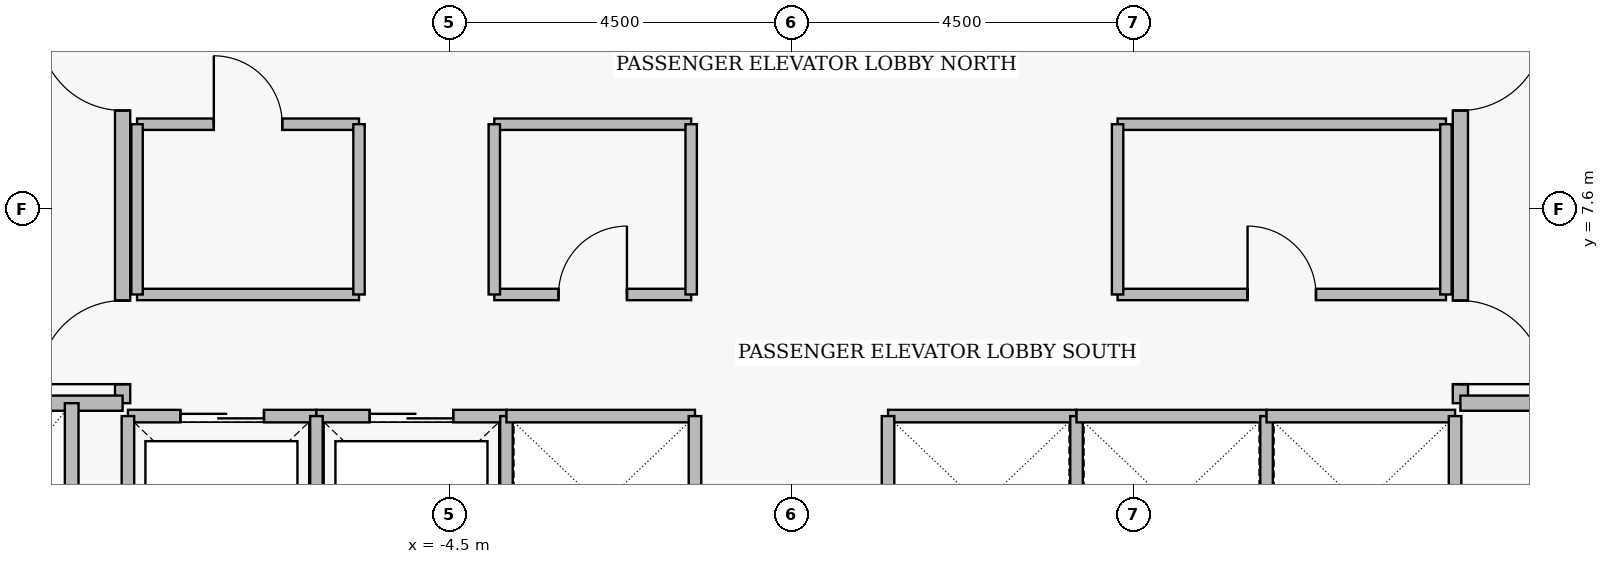
"""IFC4 building model, lengths in metres.
Left out: names, types, materials, properties, quantities, classifications, styles, units other than length and angle.
Written with IfcOpenShell. Run it as: python <this file> out.ifc"""

import sys

from ifc_helpers import new_model, si_unit, direction, frame, frame_2d, origin, place, context, subcontext, project, spatial, rectangle, extrude, element, fill, save


model = new_model("IFC4")
c1 = context("Model", 3, precision=1e-05, world=origin(), true_north=direction((0.0, 1.0)))
c2 = subcontext(c1, "Body", "Model", "MODEL_VIEW")
j1 = project(units=[si_unit("LENGTHUNIT", "METRE"), si_unit("PLANEANGLEUNIT", "RADIAN")], contexts=[c1])
p1 = place(None, origin())
s1 = spatial("IfcSite", under=j1, at=p1, CompositionType="ELEMENT")
p2 = place(p1, origin())
s2 = spatial("IfcBuilding", under=s1, at=p2, CompositionType="ELEMENT")
p3 = place(p2, frame((0.0, 0.0, 117.55)))
s3 = spatial("IfcBuildingStorey", under=s2, at=p3, CompositionType="ELEMENT", Elevation=117.55)
p4 = place(p3, frame((-8.8, 5.05, 0.0), z_axis=(0.0, 0.0, 1.0), x_axis=(0.0, 1.0, 0.0)))
e1 = element("IfcWall", 1, at=p4, inside=s3, PredefinedType="PARTITIONING", context=c2, shape_type="SweptSolid", body=[
    extrude(rectangle(XDim=6.1, YDim=0.2, at=frame_2d((3.05, 0.0))), origin(), (0.0, 0.0, 1.0), 3.43),
])
p5 = place(p4, frame((0.25, 0.0, 0.0)))
e2 = element("IfcOpeningElement", 2, at=p5, cuts=e1, PredefinedType="OPENING", context=c2, shape_type="SweptSolid", body=[
    extrude(rectangle(XDim=1.1, YDim=2.2, at=frame_2d((0.55, 1.1))), frame((0.0, 0.11, 0.0), z_axis=(0.0, -1.0, 0.0), x_axis=(1.0, 0.0, 0.0)), (0.0, 0.0, 1.0), 0.22),
])
p6 = place(p4, frame((3.85, 0.0, 0.0)))
e3 = element("IfcOpeningElement", 3, at=p6, cuts=e1, PredefinedType="OPENING", context=c2, shape_type="SweptSolid", body=[
    extrude(rectangle(XDim=1.1, YDim=2.2, at=frame_2d((0.55, 1.1))), frame((0.0, 0.11, 0.0), z_axis=(0.0, -1.0, 0.0), x_axis=(1.0, 0.0, 0.0)), (0.0, 0.0, 1.0), 0.22),
])
p7 = place(p3, frame((8.8, 11.15, 0.0), z_axis=(0.0, 0.0, 1.0), x_axis=(0.0, -1.0, 0.0)))
e4 = element("IfcWall", 4, at=p7, inside=s3, PredefinedType="PARTITIONING", context=c2, shape_type="SweptSolid", body=[
    extrude(rectangle(XDim=6.1, YDim=0.2, at=frame_2d((3.05, 0.0))), origin(), (0.0, 0.0, 1.0), 3.43),
])
p8 = place(p7, frame((1.15, 0.0, 0.0)))
e5 = element("IfcOpeningElement", 5, at=p8, cuts=e4, PredefinedType="OPENING", context=c2, shape_type="SweptSolid", body=[
    extrude(rectangle(XDim=1.1, YDim=2.2, at=frame_2d((0.55, 1.1))), frame((0.0, 0.11, 0.0), z_axis=(0.0, -1.0, 0.0), x_axis=(1.0, 0.0, 0.0)), (0.0, 0.0, 1.0), 0.22),
])
p9 = place(p7, frame((4.75, 0.0, 0.0)))
e6 = element("IfcOpeningElement", 6, at=p9, cuts=e4, PredefinedType="OPENING", context=c2, shape_type="SweptSolid", body=[
    extrude(rectangle(XDim=1.1, YDim=2.2, at=frame_2d((0.55, 1.1))), frame((0.0, 0.11, 0.0), z_axis=(0.0, -1.0, 0.0), x_axis=(1.0, 0.0, 0.0)), (0.0, 0.0, 1.0), 0.22),
])
p10 = place(p3, frame((-8.73, 4.88, 0.0), z_axis=(0.0, 0.0, 1.0), x_axis=(1.0, 0.0, 0.0)))
e7 = element("IfcWall", 7, at=p10, inside=s3, PredefinedType="PARTITIONING", context=c2, shape_type="SweptSolid", body=[
    extrude(rectangle(XDim=2.48, YDim=0.165, at=frame_2d((1.24, 0.0))), origin(), (0.0, 0.0, 1.0), 3.43),
])
p11 = place(p10, frame((0.69, 0.0, 0.0)))
e8 = element("IfcOpeningElement", 8, at=p11, cuts=e7, PredefinedType="OPENING", context=c2, shape_type="SweptSolid", body=[
    extrude(rectangle(XDim=1.1, YDim=2.25, at=frame_2d((0.55, 1.125))), frame((0.0, 0.093, 0.0), z_axis=(0.0, -1.0, 0.0), x_axis=(1.0, 0.0, 0.0)), (0.0, 0.0, 1.0), 0.185),
])
p12 = place(p3, frame((-6.25, 4.88, 0.0), z_axis=(0.0, 0.0, 1.0), x_axis=(1.0, 0.0, 0.0)))
e9 = element("IfcWall", 9, at=p12, inside=s3, PredefinedType="PARTITIONING", context=c2, shape_type="SweptSolid", body=[
    extrude(rectangle(XDim=2.5, YDim=0.165, at=frame_2d((1.25, 0.0))), origin(), (0.0, 0.0, 1.0), 3.43),
])
p13 = place(p12, frame((0.7, 0.0, 0.0)))
e10 = element("IfcOpeningElement", 10, at=p13, cuts=e9, PredefinedType="OPENING", context=c2, shape_type="SweptSolid", body=[
    extrude(rectangle(XDim=1.1, YDim=2.25, at=frame_2d((0.55, 1.125))), frame((0.0, 0.093, 0.0), z_axis=(0.0, -1.0, 0.0), x_axis=(1.0, 0.0, 0.0)), (0.0, 0.0, 1.0), 0.185),
])
p14 = place(p3, frame((-8.61, 8.72, 0.0), z_axis=(0.0, 0.0, 1.0), x_axis=(1.0, 0.0, 0.0)))
e11 = element("IfcWall", 11, at=p14, inside=s3, PredefinedType="PARTITIONING", context=c2, shape_type="SweptSolid", body=[
    extrude(rectangle(XDim=2.92, YDim=0.15, at=frame_2d((1.46, 0.0))), origin(), (0.0, 0.0, 1.0), 3.43),
])
p15 = place(p14, frame((1.01, 0.0, 0.0)))
e12 = element("IfcOpeningElement", 12, at=p15, cuts=e11, PredefinedType="OPENING", context=c2, shape_type="SweptSolid", body=[
    extrude(rectangle(XDim=0.9, YDim=2.15, at=frame_2d((0.45, 1.075))), frame((0.0, 0.085, 0.0), z_axis=(0.0, -1.0, 0.0), x_axis=(1.0, 0.0, 0.0)), (0.0, 0.0, 1.0), 0.17),
])
p16 = place(p3, frame((-3.91, 6.48, 0.0), z_axis=(0.0, 0.0, 1.0), x_axis=(1.0, 0.0, 0.0)))
e13 = element("IfcWall", 13, at=p16, inside=s3, PredefinedType="PARTITIONING", context=c2, shape_type="SweptSolid", body=[
    extrude(rectangle(XDim=2.59, YDim=0.15, at=frame_2d((1.295, 0.0))), origin(), (0.0, 0.0, 1.0), 3.43),
])
p17 = place(p16, frame((0.845, 0.0, 0.0)))
e14 = element("IfcOpeningElement", 14, at=p17, cuts=e13, PredefinedType="OPENING", context=c2, shape_type="SweptSolid", body=[
    extrude(rectangle(XDim=0.9, YDim=2.15, at=frame_2d((0.45, 1.075))), frame((0.0, 0.085, 0.0), z_axis=(0.0, -1.0, 0.0), x_axis=(1.0, 0.0, 0.0)), (0.0, 0.0, 1.0), 0.17),
])
p18 = place(p3, frame((4.29, 6.48, 0.0), z_axis=(0.0, 0.0, 1.0), x_axis=(1.0, 0.0, 0.0)))
e15 = element("IfcWall", 15, at=p18, inside=s3, PredefinedType="PARTITIONING", context=c2, shape_type="SweptSolid", body=[
    extrude(rectangle(XDim=4.32, YDim=0.15, at=frame_2d((2.16, 0.0))), origin(), (0.0, 0.0, 1.0), 3.43),
])
p19 = place(p18, frame((1.71, 0.0, 0.0)))
e16 = element("IfcOpeningElement", 16, at=p19, cuts=e15, PredefinedType="OPENING", context=c2, shape_type="SweptSolid", body=[
    extrude(rectangle(XDim=0.9, YDim=2.15, at=frame_2d((0.45, 1.075))), frame((0.0, 0.085, 0.0), z_axis=(0.0, -1.0, 0.0), x_axis=(1.0, 0.0, 0.0)), (0.0, 0.0, 1.0), 0.17),
])
for number, where, z_axis, x_axis in (
    (17, (-11.65, 5.05, 0.0), (0.0, 0.0, 1.0), (1.0, 0.0, 0.0)),
    (18, (8.8, 5.05, 0.0), (0.0, 0.0, 1.0), (1.0, 0.0, 0.0)),
):
    element("IfcWall", number, at=place(p3, frame(where, z_axis=z_axis, x_axis=x_axis)), inside=s3, PredefinedType="PARTITIONING", context=c2, shape_type="SweptSolid", body=[
        extrude(rectangle(XDim=2.85, YDim=0.2, at=frame_2d((1.425, 0.0))), origin(), (0.0, 0.0, 1.0), 3.43),
    ])
for number, where, z_axis, x_axis in (
    (19, (-8.73, 2.52, 0.0), (0.0, 0.0, 1.0), (0.0, 1.0, 0.0)),
    (20, (-6.25, 2.52, 0.0), (0.0, 0.0, 1.0), (0.0, 1.0, 0.0)),
    (21, (-3.75, 2.52, 0.0), (0.0, 0.0, 1.0), (0.0, 1.0, 0.0)),
):
    element("IfcWall", number, at=place(p3, frame(where, z_axis=z_axis, x_axis=x_axis)), inside=s3, PredefinedType="PARTITIONING", context=c2, shape_type="SweptSolid", body=[
        extrude(rectangle(XDim=2.36, YDim=0.165, at=frame_2d((1.18, 0.0))), origin(), (0.0, 0.0, 1.0), 3.43),
    ])
p20 = place(p3, frame((-3.75, 4.88, 0.0), z_axis=(0.0, 0.0, 1.0), x_axis=(1.0, 0.0, 0.0)))
e22 = element("IfcWall", 22, at=p20, inside=s3, PredefinedType="PARTITIONING", context=c2, shape_type="SweptSolid", body=[
    extrude(rectangle(XDim=2.48, YDim=0.165, at=frame_2d((1.24, 0.0))), origin(), (0.0, 0.0, 1.0), 3.43),
])
p21 = place(p3, frame((-1.27, 2.52, 0.0), z_axis=(0.0, 0.0, 1.0), x_axis=(0.0, 1.0, 0.0)))
e23 = element("IfcWall", 23, at=p21, inside=s3, PredefinedType="PARTITIONING", context=c2, shape_type="SweptSolid", body=[
    extrude(rectangle(XDim=2.36, YDim=0.165, at=frame_2d((1.18, 0.0))), origin(), (0.0, 0.0, 1.0), 3.43),
])
p22 = place(p3, frame((1.27, 4.88, 0.0), z_axis=(0.0, 0.0, 1.0), x_axis=(1.0, 0.0, 0.0)))
e24 = element("IfcWall", 24, at=p22, inside=s3, PredefinedType="PARTITIONING", context=c2, shape_type="SweptSolid", body=[
    extrude(rectangle(XDim=2.48, YDim=0.165, at=frame_2d((1.24, 0.0))), origin(), (0.0, 0.0, 1.0), 3.43),
])
for number, where, z_axis, x_axis in (
    (25, (1.27, 2.52, 0.0), (0.0, 0.0, 1.0), (0.0, 1.0, 0.0)),
    (26, (3.75, 2.52, 0.0), (0.0, 0.0, 1.0), (0.0, 1.0, 0.0)),
):
    element("IfcWall", number, at=place(p3, frame(where, z_axis=z_axis, x_axis=x_axis)), inside=s3, PredefinedType="PARTITIONING", context=c2, shape_type="SweptSolid", body=[
        extrude(rectangle(XDim=2.36, YDim=0.165, at=frame_2d((1.18, 0.0))), origin(), (0.0, 0.0, 1.0), 3.43),
    ])
p23 = place(p3, frame((3.75, 4.88, 0.0), z_axis=(0.0, 0.0, 1.0), x_axis=(1.0, 0.0, 0.0)))
e27 = element("IfcWall", 27, at=p23, inside=s3, PredefinedType="PARTITIONING", context=c2, shape_type="SweptSolid", body=[
    extrude(rectangle(XDim=2.5, YDim=0.165, at=frame_2d((1.25, 0.0))), origin(), (0.0, 0.0, 1.0), 3.43),
])
p24 = place(p3, frame((6.25, 2.52, 0.0), z_axis=(0.0, 0.0, 1.0), x_axis=(0.0, 1.0, 0.0)))
e28 = element("IfcWall", 28, at=p24, inside=s3, PredefinedType="PARTITIONING", context=c2, shape_type="SweptSolid", body=[
    extrude(rectangle(XDim=2.36, YDim=0.165, at=frame_2d((1.18, 0.0))), origin(), (0.0, 0.0, 1.0), 3.43),
])
p25 = place(p3, frame((6.25, 4.88, 0.0), z_axis=(0.0, 0.0, 1.0), x_axis=(1.0, 0.0, 0.0)))
e29 = element("IfcWall", 29, at=p25, inside=s3, PredefinedType="PARTITIONING", context=c2, shape_type="SweptSolid", body=[
    extrude(rectangle(XDim=2.48, YDim=0.165, at=frame_2d((1.24, 0.0))), origin(), (0.0, 0.0, 1.0), 3.43),
])
p26 = place(p3, frame((8.73, 2.52, 0.0), z_axis=(0.0, 0.0, 1.0), x_axis=(0.0, 1.0, 0.0)))
e30 = element("IfcWall", 30, at=p26, inside=s3, PredefinedType="PARTITIONING", context=c2, shape_type="SweptSolid", body=[
    extrude(rectangle(XDim=2.36, YDim=0.165, at=frame_2d((1.18, 0.0))), origin(), (0.0, 0.0, 1.0), 3.43),
])
p27 = place(p3, frame((-9.47, 2.45, 0.0), z_axis=(0.0, 0.0, 1.0), x_axis=(0.0, 1.0, 0.0)))
e31 = element("IfcWall", 31, at=p27, inside=s3, PredefinedType="PARTITIONING", context=c2, shape_type="SweptSolid", body=[
    extrude(rectangle(XDim=2.6, YDim=0.18, at=frame_2d((1.3, 0.0))), origin(), (0.0, 0.0, 1.0), 3.43),
])
p28 = place(p3, frame((-8.61, 6.48, 0.0), z_axis=(0.0, 0.0, 1.0), x_axis=(1.0, 0.0, 0.0)))
e32 = element("IfcWall", 32, at=p28, inside=s3, PredefinedType="PARTITIONING", context=c2, shape_type="SweptSolid", body=[
    extrude(rectangle(XDim=2.92, YDim=0.15, at=frame_2d((1.46, 0.0))), origin(), (0.0, 0.0, 1.0), 3.43),
])
for number, where, z_axis, x_axis in (
    (33, (-8.61, 6.48, 0.0), (0.0, 0.0, 1.0), (0.0, 1.0, 0.0)),
    (34, (-5.69, 6.48, 0.0), (0.0, 0.0, 1.0), (0.0, 1.0, 0.0)),
):
    element("IfcWall", number, at=place(p3, frame(where, z_axis=z_axis, x_axis=x_axis)), inside=s3, PredefinedType="PARTITIONING", context=c2, shape_type="SweptSolid", body=[
        extrude(rectangle(XDim=2.24, YDim=0.15, at=frame_2d((1.12, 0.0))), origin(), (0.0, 0.0, 1.0), 3.43),
    ])
p29 = place(p3, frame((-3.91, 8.72, 0.0), z_axis=(0.0, 0.0, 1.0), x_axis=(1.0, 0.0, 0.0)))
e35 = element("IfcWall", 35, at=p29, inside=s3, PredefinedType="PARTITIONING", context=c2, shape_type="SweptSolid", body=[
    extrude(rectangle(XDim=2.59, YDim=0.15, at=frame_2d((1.295, 0.0))), origin(), (0.0, 0.0, 1.0), 3.43),
])
for number, where, z_axis, x_axis in (
    (36, (-3.91, 6.48, 0.0), (0.0, 0.0, 1.0), (0.0, 1.0, 0.0)),
    (37, (-1.32, 6.48, 0.0), (0.0, 0.0, 1.0), (0.0, 1.0, 0.0)),
):
    element("IfcWall", number, at=place(p3, frame(where, z_axis=z_axis, x_axis=x_axis)), inside=s3, PredefinedType="PARTITIONING", context=c2, shape_type="SweptSolid", body=[
        extrude(rectangle(XDim=2.24, YDim=0.15, at=frame_2d((1.12, 0.0))), origin(), (0.0, 0.0, 1.0), 3.43),
    ])
p30 = place(p3, frame((4.29, 8.72, 0.0), z_axis=(0.0, 0.0, 1.0), x_axis=(1.0, 0.0, 0.0)))
e38 = element("IfcWall", 38, at=p30, inside=s3, PredefinedType="PARTITIONING", context=c2, shape_type="SweptSolid", body=[
    extrude(rectangle(XDim=4.32, YDim=0.15, at=frame_2d((2.16, 0.0))), origin(), (0.0, 0.0, 1.0), 3.43),
])
for number, where, z_axis, x_axis in (
    (39, (4.29, 6.48, 0.0), (0.0, 0.0, 1.0), (0.0, 1.0, 0.0)),
    (40, (8.61, 6.48, 0.0), (0.0, 0.0, 1.0), (0.0, 1.0, 0.0)),
):
    element("IfcWall", number, at=place(p3, frame(where, z_axis=z_axis, x_axis=x_axis)), inside=s3, PredefinedType="PARTITIONING", context=c2, shape_type="SweptSolid", body=[
        extrude(rectangle(XDim=2.24, YDim=0.15, at=frame_2d((1.12, 0.0))), origin(), (0.0, 0.0, 1.0), 3.43),
    ])
p31 = place(p5, origin())
e41 = element("IfcDoor", 41, at=p31, inside=s3, OperationType="SINGLE_SWING_LEFT", PredefinedType="DOOR", context=c2, shape_type="SweptSolid", body=[
    extrude(rectangle(XDim=1.1, YDim=2.2, at=frame_2d((0.55, 1.1))), frame((0.0, 0.025, 0.0), z_axis=(0.0, -1.0, 0.0), x_axis=(1.0, 0.0, 0.0)), (0.0, 0.0, 1.0), 0.05),
])
fill(e2, e41)
p32 = place(p6, origin())
e42 = element("IfcDoor", 42, at=p32, inside=s3, OperationType="SINGLE_SWING_RIGHT", PredefinedType="DOOR", context=c2, shape_type="SweptSolid", body=[
    extrude(rectangle(XDim=1.1, YDim=2.2, at=frame_2d((0.55, 1.1))), frame((0.0, 0.025, 0.0), z_axis=(0.0, -1.0, 0.0), x_axis=(1.0, 0.0, 0.0)), (0.0, 0.0, 1.0), 0.05),
])
fill(e3, e42)
p33 = place(p8, origin())
e43 = element("IfcDoor", 43, at=p33, inside=s3, OperationType="SINGLE_SWING_LEFT", PredefinedType="DOOR", context=c2, shape_type="SweptSolid", body=[
    extrude(rectangle(XDim=1.1, YDim=2.2, at=frame_2d((0.55, 1.1))), frame((0.0, 0.025, 0.0), z_axis=(0.0, -1.0, 0.0), x_axis=(1.0, 0.0, 0.0)), (0.0, 0.0, 1.0), 0.05),
])
fill(e5, e43)
p34 = place(p9, origin())
e44 = element("IfcDoor", 44, at=p34, inside=s3, OperationType="SINGLE_SWING_RIGHT", PredefinedType="DOOR", context=c2, shape_type="SweptSolid", body=[
    extrude(rectangle(XDim=1.1, YDim=2.2, at=frame_2d((0.55, 1.1))), frame((0.0, 0.025, 0.0), z_axis=(0.0, -1.0, 0.0), x_axis=(1.0, 0.0, 0.0)), (0.0, 0.0, 1.0), 0.05),
])
fill(e6, e44)
p35 = place(p11, origin())
e45 = element("IfcDoor", 45, at=p35, inside=s3, OperationType="SLIDING_TO_LEFT", PredefinedType="DOOR", context=c2, shape_type="SweptSolid", body=[
    extrude(rectangle(XDim=1.1, YDim=2.25, at=frame_2d((0.55, 1.125))), frame((0.0, 0.025, 0.0), z_axis=(0.0, -1.0, 0.0), x_axis=(1.0, 0.0, 0.0)), (0.0, 0.0, 1.0), 0.05),
])
fill(e8, e45)
p36 = place(p13, origin())
e46 = element("IfcDoor", 46, at=p36, inside=s3, OperationType="SLIDING_TO_LEFT", PredefinedType="DOOR", context=c2, shape_type="SweptSolid", body=[
    extrude(rectangle(XDim=1.1, YDim=2.25, at=frame_2d((0.55, 1.125))), frame((0.0, 0.025, 0.0), z_axis=(0.0, -1.0, 0.0), x_axis=(1.0, 0.0, 0.0)), (0.0, 0.0, 1.0), 0.05),
])
fill(e10, e46)
p37 = place(p15, origin())
e47 = element("IfcDoor", 47, at=p37, inside=s3, OperationType="SINGLE_SWING_LEFT", PredefinedType="DOOR", context=c2, shape_type="SweptSolid", body=[
    extrude(rectangle(XDim=0.9, YDim=2.15, at=frame_2d((0.45, 1.075))), frame((0.0, 0.025, 0.0), z_axis=(0.0, -1.0, 0.0), x_axis=(1.0, 0.0, 0.0)), (0.0, 0.0, 1.0), 0.05),
])
fill(e12, e47)
p38 = place(p17, origin())
e48 = element("IfcDoor", 48, at=p38, inside=s3, OperationType="SINGLE_SWING_RIGHT", PredefinedType="DOOR", context=c2, shape_type="SweptSolid", body=[
    extrude(rectangle(XDim=0.9, YDim=2.15, at=frame_2d((0.45, 1.075))), frame((0.0, 0.025, 0.0), z_axis=(0.0, -1.0, 0.0), x_axis=(1.0, 0.0, 0.0)), (0.0, 0.0, 1.0), 0.05),
])
fill(e14, e48)
p39 = place(p19, origin())
e49 = element("IfcDoor", 49, at=p39, inside=s3, OperationType="SINGLE_SWING_LEFT", PredefinedType="DOOR", context=c2, shape_type="SweptSolid", body=[
    extrude(rectangle(XDim=0.9, YDim=2.15, at=frame_2d((0.45, 1.075))), frame((0.0, 0.025, 0.0), z_axis=(0.0, -1.0, 0.0), x_axis=(1.0, 0.0, 0.0)), (0.0, 0.0, 1.0), 0.05),
])
fill(e16, e49)
save(model, sys.argv[1])
